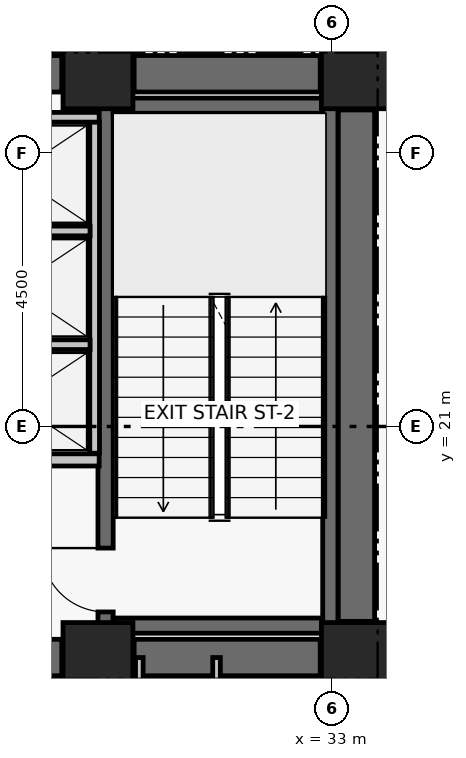
"""IFC4 building model, lengths in metres.
Left out: names, types, materials, properties, quantities, classifications, styles, units other than length and angle.
Written with IfcOpenShell. Run it as: python <this file> out.ifc"""

import sys

from ifc_helpers import new_model, si_unit, direction, frame, frame_2d, origin, origin_2d, place, context, subcontext, project, spatial, rectangle, extrude, element, fill, save


model = new_model("IFC4")
c1 = context("Model", 3, precision=1e-05, world=origin(), true_north=direction((0.0, 1.0)))
c2 = subcontext(c1, "Body", "Model", "MODEL_VIEW")
j1 = project(units=[si_unit("LENGTHUNIT", "METRE"), si_unit("PLANEANGLEUNIT", "RADIAN")], contexts=[c1])
p1 = place(None, origin())
s1 = spatial("IfcSite", under=j1, at=p1, CompositionType="ELEMENT")
p2 = place(p1, origin())
s2 = spatial("IfcBuilding", under=s1, at=p2, CompositionType="ELEMENT")
p3 = place(p2, frame((0.0, 0.0, 61.08)))
s3 = spatial("IfcBuildingStorey", under=s2, at=p3, CompositionType="ELEMENT", Elevation=61.08)
for number, where, z_axis, x_axis in (
    (1, (29.15, 17.2, 0.0), (0.0, 0.0, 1.0), (1.0, 0.0, 0.0)),
    (2, (33.4, 17.2, 0.0), (0.0, 0.0, 1.0), (1.0, 0.0, 0.0)),
    (3, (29.15, 26.8, 0.0), (0.0, 0.0, 1.0), (1.0, 0.0, 0.0)),
    (4, (33.4, 26.8, 0.0), (0.0, 0.0, 1.0), (1.0, 0.0, 0.0)),
):
    element("IfcColumn", number, at=place(p3, frame(where, z_axis=z_axis, x_axis=x_axis)), inside=s3, PredefinedType="COLUMN", context=c2, shape_type="SweptSolid", body=[
        extrude(rectangle(XDim=1.15, YDim=1.15, at=origin_2d()), origin(), (0.0, 0.0, 1.0), 3.72),
    ])
p4 = place(p3, frame((26.85, 17.2, 0.0), z_axis=(0.0, 0.0, 1.0), x_axis=(1.0, 0.0, 0.0)))
e5 = element("IfcWall", 5, at=p4, inside=s3, PredefinedType="SHEAR", context=c2, shape_type="SweptSolid", body=[
    extrude(rectangle(XDim=1.705, YDim=0.6, at=frame_2d((0.853, 0.0))), origin(), (0.0, 0.0, 1.0), 3.47),
])
p5 = place(p3, frame((29.745, 17.2, 0.0), z_axis=(0.0, 0.0, 1.0), x_axis=(1.0, 0.0, 0.0)))
e6 = element("IfcWall", 6, at=p5, inside=s3, PredefinedType="SHEAR", context=c2, shape_type="SweptSolid", body=[
    extrude(rectangle(XDim=3.06, YDim=0.6, at=frame_2d((1.53, 0.0))), origin(), (0.0, 0.0, 1.0), 3.47),
])
p6 = place(p3, frame((26.85, 26.8, 0.0), z_axis=(0.0, 0.0, 1.0), x_axis=(1.0, 0.0, 0.0)))
e7 = element("IfcWall", 7, at=p6, inside=s3, PredefinedType="SHEAR", context=c2, shape_type="SweptSolid", body=[
    extrude(rectangle(XDim=1.705, YDim=0.6, at=frame_2d((0.853, 0.0))), origin(), (0.0, 0.0, 1.0), 3.47),
])
p7 = place(p3, frame((29.745, 26.8, 0.0), z_axis=(0.0, 0.0, 1.0), x_axis=(1.0, 0.0, 0.0)))
e8 = element("IfcWall", 8, at=p7, inside=s3, PredefinedType="SHEAR", context=c2, shape_type="SweptSolid", body=[
    extrude(rectangle(XDim=3.06, YDim=0.6, at=frame_2d((1.53, 0.0))), origin(), (0.0, 0.0, 1.0), 3.47),
])
p8 = place(p3, frame((33.4, 17.795, 0.0), z_axis=(0.0, 0.0, 1.0), x_axis=(0.0, 1.0, 0.0)))
e9 = element("IfcWall", 9, at=p8, inside=s3, PredefinedType="SHEAR", context=c2, shape_type="SweptSolid", body=[
    extrude(rectangle(XDim=8.41, YDim=0.6, at=frame_2d((4.205, 0.0))), origin(), (0.0, 0.0, 1.0), 3.47),
])
p9 = place(p3, frame((29.275, 17.6, 0.0), z_axis=(0.0, 0.0, 1.0), x_axis=(0.0, 1.0, 0.0)))
e10 = element("IfcWall", 10, at=p9, inside=s3, PredefinedType="SHEAR", context=c2, shape_type="SweptSolid", body=[
    extrude(rectangle(XDim=8.8, YDim=0.25, at=frame_2d((4.4, 0.0))), origin(), (0.0, 0.0, 1.0), 3.47),
])
p10 = place(p9, frame((0.35, 0.0, 0.0)))
e11 = element("IfcOpeningElement", 11, at=p10, cuts=e10, PredefinedType="OPENING", context=c2, shape_type="SweptSolid", body=[
    extrude(rectangle(XDim=1.05, YDim=2.08, at=frame_2d((0.525, 1.04))), frame((0.0, 0.135, 0.0), z_axis=(0.0, -1.0, 0.0), x_axis=(1.0, 0.0, 0.0)), (0.0, 0.0, 1.0), 0.27),
])
p11 = place(p3, frame((32.971, 17.6, 0.0), z_axis=(0.0, 0.0, 1.0), x_axis=(0.0, 1.0, 0.0)))
e12 = element("IfcWall", 12, at=p11, inside=s3, PredefinedType="SHEAR", context=c2, shape_type="SweptSolid", body=[
    extrude(rectangle(XDim=8.8, YDim=0.25, at=frame_2d((4.4, 0.0))), origin(), (0.0, 0.0, 1.0), 3.47),
])
for number, where, z_axis, x_axis in (
    (13, (29.4, 17.725, 0.0), (0.0, 0.0, 1.0), (1.0, 0.0, 0.0)),
    (14, (29.4, 26.275, 0.0), (0.0, 0.0, 1.0), (1.0, 0.0, 0.0)),
):
    element("IfcWall", number, at=place(p3, frame(where, z_axis=z_axis, x_axis=x_axis)), inside=s3, PredefinedType="SHEAR", context=c2, shape_type="SweptSolid", body=[
        extrude(rectangle(XDim=3.446, YDim=0.25, at=frame_2d((1.723, 0.0))), origin(), (0.0, 0.0, 1.0), 3.47),
    ])
p12 = place(p3, frame((26.37, 20.45, 0.0), z_axis=(0.0, 0.0, 1.0), x_axis=(1.0, 0.0, 0.0)))
e15 = element("IfcWall", 15, at=p12, inside=s3, PredefinedType="PARTITIONING", context=c2, shape_type="SweptSolid", body=[
    extrude(rectangle(XDim=2.8, YDim=0.2, at=frame_2d((1.4, 0.0))), origin(), (0.0, 0.0, 1.0), 3.47),
])
p13 = place(p12, frame((0.78, 0.0, 0.0)))
e16 = element("IfcOpeningElement", 16, at=p13, cuts=e15, PredefinedType="OPENING", context=c2, shape_type="SweptSolid", body=[
    extrude(rectangle(XDim=1.1, YDim=2.08, at=frame_2d((0.55, 1.04))), frame((0.0, 0.11, 0.0), z_axis=(0.0, -1.0, 0.0), x_axis=(1.0, 0.0, 0.0)), (0.0, 0.0, 1.0), 0.22),
])
p14 = place(p3, frame((29.095, 20.56, 0.0), z_axis=(0.0, 0.0, 1.0), x_axis=(0.0, 1.0, 0.0)))
e17 = element("IfcWall", 17, at=p14, inside=s3, PredefinedType="PARTITIONING", context=c2, shape_type="SweptSolid", body=[
    extrude(rectangle(XDim=5.45, YDim=0.16, at=frame_2d((2.725, 0.0))), origin(), (0.0, 0.0, 1.0), 3.47),
])
p15 = place(p3, frame((26.37, 22.345, 0.0), z_axis=(0.0, 0.0, 1.0), x_axis=(1.0, 0.0, 0.0)))
e18 = element("IfcWall", 18, at=p15, inside=s3, PredefinedType="PARTITIONING", context=c2, shape_type="SweptSolid", body=[
    extrude(rectangle(XDim=2.65, YDim=0.16, at=frame_2d((1.325, 0.0))), origin(), (0.0, 0.0, 1.0), 3.47),
])
p16 = place(p3, frame((26.53, 24.215, 0.0), z_axis=(0.0, 0.0, 1.0), x_axis=(1.0, 0.0, 0.0)))
e19 = element("IfcWall", 19, at=p16, inside=s3, PredefinedType="PARTITIONING", context=c2, shape_type="SweptSolid", body=[
    extrude(rectangle(XDim=2.49, YDim=0.16, at=frame_2d((1.245, 0.0))), origin(), (0.0, 0.0, 1.0), 3.47),
])
p17 = place(p3, frame((26.34, 26.085, 0.0), z_axis=(0.0, 0.0, 1.0), x_axis=(1.0, 0.0, 0.0)))
e20 = element("IfcWall", 20, at=p17, inside=s3, PredefinedType="PARTITIONING", context=c2, shape_type="SweptSolid", body=[
    extrude(rectangle(XDim=2.83, YDim=0.16, at=frame_2d((1.415, 0.0))), origin(), (0.0, 0.0, 1.0), 3.47),
])
for number, where, z_axis, x_axis in (
    (21, (29.83, 14.95, 0.0), (0.0, 0.0, 1.0), (0.0, 1.0, 0.0)),
    (22, (31.1, 14.95, 0.0), (0.0, 0.0, 1.0), (0.0, 1.0, 0.0)),
):
    element("IfcWall", number, at=place(p3, frame(where, z_axis=z_axis, x_axis=x_axis)), inside=s3, PredefinedType="PARTITIONING", context=c2, shape_type="SweptSolid", body=[
        extrude(rectangle(XDim=2.25, YDim=0.125, at=frame_2d((1.125, 0.0))), origin(), (0.0, 0.0, 1.0), 2.6),
    ])
p18 = place(p3, frame((33.74, 27.22, 0.0), z_axis=(0.0, 0.0, 1.0), x_axis=(-1.0, 0.0, 0.0)))
e23 = element("IfcWall", 23, at=p18, inside=s3, PredefinedType="PARTITIONING", context=c2, shape_type="SweptSolid", body=[
    extrude(rectangle(XDim=0.86, YDim=0.145, at=frame_2d((0.43, 0.0))), origin(), (0.0, 0.0, 1.0), 2.6),
])
p19 = place(p10, origin())
e24 = element("IfcDoor", 24, at=p19, inside=s3, OperationType="SINGLE_SWING_RIGHT", PredefinedType="DOOR", context=c2, shape_type="SweptSolid", body=[
    extrude(rectangle(XDim=1.05, YDim=2.08, at=frame_2d((0.525, 1.04))), frame((0.0, 0.025, 0.0), z_axis=(0.0, -1.0, 0.0), x_axis=(1.0, 0.0, 0.0)), (0.0, 0.0, 1.0), 0.05),
])
fill(e11, e24)
save(model, sys.argv[1])
